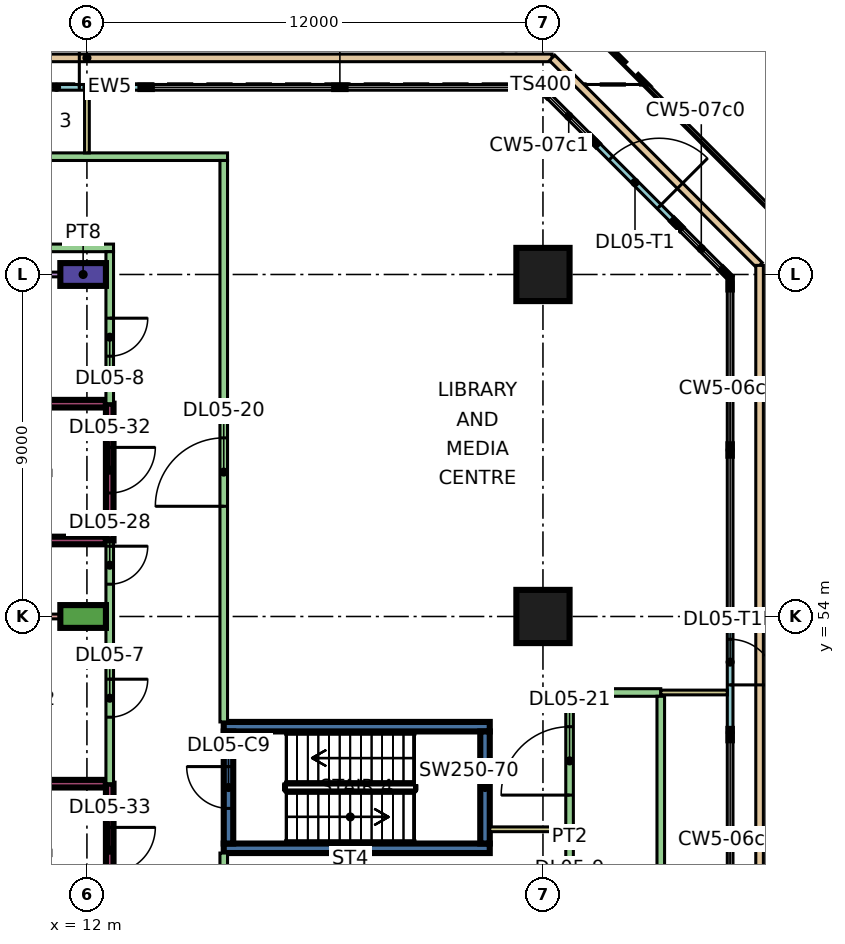
"""IFC4 building model, lengths in metres.
Left out: names, types, materials, properties, quantities, classifications, styles, units other than length and angle.
Written with IfcOpenShell. Run it as: python <this file> out.ifc"""

import sys

from ifc_helpers import new_model, si_unit, direction, frame, frame_2d, origin, origin_2d, place, context, subcontext, project, spatial, rectangle, extrude, element, fill, save


model = new_model("IFC4")
c1 = context("Model", 3, precision=1e-05, world=origin(), true_north=direction((0.0, 1.0)))
c2 = subcontext(c1, "Body", "Model", "MODEL_VIEW")
j1 = project(units=[si_unit("LENGTHUNIT", "METRE"), si_unit("PLANEANGLEUNIT", "RADIAN")], contexts=[c1])
p1 = place(None, origin())
s1 = spatial("IfcSite", under=j1, at=p1, CompositionType="ELEMENT")
p2 = place(p1, origin())
s2 = spatial("IfcBuilding", under=s1, at=p2, CompositionType="ELEMENT")
p3 = place(p2, frame((0.0, 0.0, 26.4)))
s3 = spatial("IfcBuildingStorey", under=s2, at=p3, CompositionType="ELEMENT", Elevation=26.4)
for number, where, z_axis, x_axis in (
    (1, (24.0, 54.0, 0.0), (0.0, 0.0, 1.0), (1.0, 0.0, 0.0)),
    (2, (24.0, 63.0, 0.0), (0.0, 0.0, 1.0), (1.0, 0.0, 0.0)),
):
    element("IfcColumn", number, at=place(p3, frame(where, z_axis=z_axis, x_axis=x_axis)), inside=s3, PredefinedType="COLUMN", context=c2, shape_type="SweptSolid", body=[
        extrude(rectangle(XDim=1.4, YDim=1.4, at=origin_2d()), origin(), (0.0, 0.0, 1.0), 9.0),
    ])
for number, where, z_axis, x_axis in (
    (3, (15.6, 47.9, 0.0), (0.0, 0.0, 1.0), (1.0, 0.0, 0.0)),
    (4, (15.6, 51.1, 0.0), (0.0, 0.0, 1.0), (1.0, 0.0, 0.0)),
):
    element("IfcWall", number, at=place(p3, frame(where, z_axis=z_axis, x_axis=x_axis)), inside=s3, PredefinedType="SHEAR", context=c2, shape_type="SweptSolid", body=[
        extrude(rectangle(XDim=7.0, YDim=0.25, at=frame_2d((3.5, 0.0))), origin(), (0.0, 0.0, 1.0), 9.0),
    ])
p4 = place(p3, frame((15.725, 48.025, 0.0), z_axis=(0.0, 0.0, 1.0), x_axis=(0.0, 1.0, 0.0)))
e5 = element("IfcWall", 5, at=p4, inside=s3, PredefinedType="SHEAR", context=c2, shape_type="SweptSolid", body=[
    extrude(rectangle(XDim=2.95, YDim=0.25, at=frame_2d((1.475, 0.0))), origin(), (0.0, 0.0, 1.0), 9.0),
])
p5 = place(p4, frame((0.925, 0.0, 0.0)))
e6 = element("IfcOpeningElement", 6, at=p5, cuts=e5, PredefinedType="OPENING", context=c2, shape_type="SweptSolid", body=[
    extrude(rectangle(XDim=1.1, YDim=2.2, at=frame_2d((0.55, 1.1))), frame((0.0, 0.135, 0.0), z_axis=(0.0, -1.0, 0.0), x_axis=(1.0, 0.0, 0.0)), (0.0, 0.0, 1.0), 0.27),
])
p6 = place(p3, frame((22.475, 48.025, 0.0), z_axis=(0.0, 0.0, 1.0), x_axis=(0.0, 1.0, 0.0)))
e7 = element("IfcWall", 7, at=p6, inside=s3, PredefinedType="SHEAR", context=c2, shape_type="SweptSolid", body=[
    extrude(rectangle(XDim=2.95, YDim=0.25, at=frame_2d((1.475, 0.0))), origin(), (0.0, 0.0, 1.0), 9.0),
])
p7 = place(p3, frame((28.925, 50.95, 0.0), z_axis=(0.0, 0.0, 1.0), x_axis=(0.0, 1.0, 0.0)))
e8 = element("IfcWall", 8, at=p7, inside=s3, PredefinedType="SOLIDWALL", context=c2, shape_type="SweptSolid", body=[
    extrude(rectangle(XDim=3.0, YDim=0.15, at=frame_2d((1.5, 0.0))), origin(), (0.0, 0.0, 1.0), 8.45),
])
p8 = place(p7, frame((1.25, 0.0, 0.0)))
e9 = element("IfcOpeningElement", 9, at=p8, cuts=e8, PredefinedType="OPENING", context=c2, shape_type="SweptSolid", body=[
    extrude(rectangle(XDim=1.2, YDim=2.4, at=frame_2d((0.6, 1.2))), frame((0.0, 0.085, 0.0), z_axis=(0.0, -1.0, 0.0), x_axis=(1.0, 0.0, 0.0)), (0.0, 0.0, 1.0), 0.17),
])
p9 = place(p3, frame((27.482, 64.361, 0.0), z_axis=(0.0, 0.0, 1.0), x_axis=(-0.707106781187, 0.707106781187, 0.0)))
e10 = element("IfcWall", 10, at=p9, inside=s3, PredefinedType="SOLIDWALL", context=c2, shape_type="SweptSolid", body=[
    extrude(rectangle(XDim=3.0, YDim=0.15, at=frame_2d((1.5, 0.0))), origin(), (0.0, 0.0, 1.0), 8.45),
])
p10 = place(p9, frame((0.6, 0.0, 0.0)))
e11 = element("IfcOpeningElement", 11, at=p10, cuts=e10, PredefinedType="OPENING", context=c2, shape_type="SweptSolid", body=[
    extrude(rectangle(XDim=1.8, YDim=2.4, at=frame_2d((0.9, 1.2))), frame((0.0, 0.085, 0.0), z_axis=(0.0, -1.0, 0.0), x_axis=(1.0, 0.0, 0.0)), (0.0, 0.0, 1.0), 0.17),
])
p11 = place(p3, frame((13.5, 67.925, 0.0), z_axis=(0.0, 0.0, 1.0), x_axis=(-1.0, 0.0, 0.0)))
e12 = element("IfcWall", 12, at=p11, inside=s3, PredefinedType="SOLIDWALL", context=c2, shape_type="SweptSolid", body=[
    extrude(rectangle(XDim=3.0, YDim=0.15, at=frame_2d((1.5, 0.0))), origin(), (0.0, 0.0, 1.0), 8.45),
])
p12 = place(p11, frame((1.7, 0.0, 0.0)))
e13 = element("IfcOpeningElement", 13, at=p12, cuts=e12, PredefinedType="OPENING", context=c2, shape_type="SweptSolid", body=[
    extrude(rectangle(XDim=1.2, YDim=2.4, at=frame_2d((0.6, 1.2))), frame((0.0, 0.085, 0.0), z_axis=(0.0, -1.0, 0.0), x_axis=(1.0, 0.0, 0.0)), (0.0, 0.0, 1.0), 0.17),
])
p13 = place(p3, frame((-0.24, 68.7, 0.0), z_axis=(0.0, 0.0, 1.0), x_axis=(1.0, 0.0, 0.0)))
e14 = element("IfcWall", 14, at=p13, inside=s3, PredefinedType="PARAPET", context=c2, shape_type="SweptSolid", body=[
    extrude(rectangle(XDim=24.479, YDim=0.2, at=frame_2d((12.24, 0.0))), origin(), (0.0, 0.0, 1.0), 0.5),
])
p14 = place(p3, frame((24.24, 68.7, 0.0), z_axis=(0.0, 0.0, 1.0), x_axis=(0.707106781187, -0.707106781187, 0.0)))
e15 = element("IfcWall", 15, at=p14, inside=s3, PredefinedType="PARAPET", context=c2, shape_type="SweptSolid", body=[
    extrude(rectangle(XDim=7.722, YDim=0.2, at=frame_2d((3.861, 0.0))), origin(), (0.0, 0.0, 1.0), 0.5),
])
p15 = place(p3, frame((29.7, 63.24, 0.0), z_axis=(0.0, 0.0, 1.0), x_axis=(0.0, -1.0, 0.0)))
e16 = element("IfcWall", 16, at=p15, inside=s3, PredefinedType="PARAPET", context=c2, shape_type="SweptSolid", body=[
    extrude(rectangle(XDim=21.0, YDim=0.2, at=frame_2d((10.5, 0.0))), origin(), (0.0, 0.0, 1.0), 0.5),
])
p16 = place(p3, frame((-0.8, 66.1, 0.0), z_axis=(0.0, 0.0, 1.0), x_axis=(1.0, 0.0, 0.0)))
e17 = element("IfcWall", 17, at=p16, inside=s3, PredefinedType="PARTITIONING", context=c2, shape_type="SweptSolid", body=[
    extrude(rectangle(XDim=16.5, YDim=0.2, at=frame_2d((8.25, 0.0))), origin(), (0.0, 0.0, 1.0), 8.45),
])
p17 = place(p16, frame((6.4, 0.0, 0.0)))
e18 = element("IfcOpeningElement", 18, at=p17, cuts=e17, PredefinedType="OPENING", context=c2, shape_type="SweptSolid", body=[
    extrude(rectangle(XDim=1.0, YDim=2.1, at=frame_2d((0.5, 1.05))), frame((0.0, 0.11, 0.0), z_axis=(0.0, -1.0, 0.0), x_axis=(1.0, 0.0, 0.0)), (0.0, 0.0, 1.0), 0.22),
])
p18 = place(p3, frame((-0.6, 49.6, 0.0), z_axis=(0.0, 0.0, 1.0), x_axis=(1.0, 0.0, 0.0)))
e19 = element("IfcWall", 19, at=p18, inside=s3, PredefinedType="SOLIDWALL", context=c2, shape_type="SweptSolid", body=[
    extrude(rectangle(XDim=13.1, YDim=0.2, at=frame_2d((6.55, 0.0))), origin(), (0.0, 0.0, 1.0), 8.45),
])
p19 = place(p3, frame((-0.6, 54.0, 0.0), z_axis=(0.0, 0.0, 1.0), x_axis=(1.0, 0.0, 0.0)))
e20 = element("IfcWall", 20, at=p19, inside=s3, PredefinedType="PARTITIONING", context=c2, shape_type="SweptSolid", body=[
    extrude(rectangle(XDim=11.9, YDim=0.125, at=frame_2d((5.95, 0.0))), origin(), (0.0, 0.0, 1.0), 6.55),
])
for number, where, z_axis, x_axis in (
    (21, (-0.6, 56.0, 0.0), (0.0, 0.0, 1.0), (1.0, 0.0, 0.0)),
    (22, (-0.6, 59.6, 0.0), (0.0, 0.0, 1.0), (1.0, 0.0, 0.0)),
):
    element("IfcWall", number, at=place(p3, frame(where, z_axis=z_axis, x_axis=x_axis)), inside=s3, PredefinedType="SOLIDWALL", context=c2, shape_type="SweptSolid", body=[
        extrude(rectangle(XDim=13.1, YDim=0.2, at=frame_2d((6.55, 0.0))), origin(), (0.0, 0.0, 1.0), 8.45),
    ])
p20 = place(p3, frame((-0.6, 63.7, 0.0), z_axis=(0.0, 0.0, 1.0), x_axis=(1.0, 0.0, 0.0)))
e23 = element("IfcWall", 23, at=p20, inside=s3, PredefinedType="PARTITIONING", context=c2, shape_type="SweptSolid", body=[
    extrude(rectangle(XDim=13.3, YDim=0.2, at=frame_2d((6.65, 0.0))), origin(), (0.0, 0.0, 1.0), 8.45),
])
p21 = place(p20, frame((6.05, 0.0, 0.0)))
e24 = element("IfcOpeningElement", 24, at=p21, cuts=e23, PredefinedType="OPENING", context=c2, shape_type="SweptSolid", body=[
    extrude(rectangle(XDim=1.0, YDim=2.1, at=frame_2d((0.5, 1.05))), frame((0.0, 0.11, 0.0), z_axis=(0.0, -1.0, 0.0), x_axis=(1.0, 0.0, 0.0)), (0.0, 0.0, 1.0), 0.22),
])
p22 = place(p3, frame((5.938, 63.0, 0.0), z_axis=(0.0, 0.0, 1.0), x_axis=(1.0, 0.0, 0.0)))
e25 = element("IfcWall", 25, at=p22, inside=s3, PredefinedType="PARTITIONING", context=c2, shape_type="SweptSolid", body=[
    extrude(rectangle(XDim=5.362, YDim=0.125, at=frame_2d((2.681, 0.0))), origin(), (0.0, 0.0, 1.0), 6.95),
])
p23 = place(p3, frame((12.0, 66.2, 0.0), z_axis=(0.0, 0.0, 1.0), x_axis=(0.0, 1.0, 0.0)))
e26 = element("IfcWall", 26, at=p23, inside=s3, PredefinedType="PARTITIONING", context=c2, shape_type="SweptSolid", body=[
    extrude(rectangle(XDim=1.651, YDim=0.125, at=frame_2d((0.826, 0.0))), origin(), (0.0, 0.0, 1.0), 8.45),
])
p24 = place(p3, frame((12.6, 45.0, 0.0), z_axis=(0.0, 0.0, 1.0), x_axis=(0.0, 1.0, 0.0)))
e27 = element("IfcWall", 27, at=p24, inside=s3, PredefinedType="SOLIDWALL", context=c2, shape_type="SweptSolid", body=[
    extrude(rectangle(XDim=4.6, YDim=0.2, at=frame_2d((2.3, 0.0))), origin(), (0.0, 0.0, 1.0), 8.45),
])
p25 = place(p24, frame((2.25, 0.0, 0.0)))
e28 = element("IfcOpeningElement", 28, at=p25, cuts=e27, PredefinedType="OPENING", context=c2, shape_type="SweptSolid", body=[
    extrude(rectangle(XDim=1.2, YDim=2.1, at=frame_2d((0.6, 1.05))), frame((0.0, 0.11, 0.0), z_axis=(0.0, -1.0, 0.0), x_axis=(1.0, 0.0, 0.0)), (0.0, 0.0, 1.0), 0.22),
])
p26 = place(p3, frame((12.6, 49.6, 0.0), z_axis=(0.0, 0.0, 1.0), x_axis=(0.0, 1.0, 0.0)))
e29 = element("IfcWall", 29, at=p26, inside=s3, PredefinedType="PARTITIONING", context=c2, shape_type="SweptSolid", body=[
    extrude(rectangle(XDim=6.4, YDim=0.2, at=frame_2d((3.2, 0.0))), origin(), (0.0, 0.0, 1.0), 8.45),
])
p27 = place(p26, frame((1.75, 0.0, 0.0)))
e30 = element("IfcOpeningElement", 30, at=p27, cuts=e29, PredefinedType="OPENING", context=c2, shape_type="SweptSolid", body=[
    extrude(rectangle(XDim=1.0, YDim=2.1, at=frame_2d((0.5, 1.05))), frame((0.0, 0.11, 0.0), z_axis=(0.0, -1.0, 0.0), x_axis=(1.0, 0.0, 0.0)), (0.0, 0.0, 1.0), 0.22),
])
p28 = place(p26, frame((5.25, 0.0, 0.0)))
e31 = element("IfcOpeningElement", 31, at=p28, cuts=e29, PredefinedType="OPENING", context=c2, shape_type="SweptSolid", body=[
    extrude(rectangle(XDim=1.0, YDim=2.1, at=frame_2d((0.5, 1.05))), frame((0.0, 0.11, 0.0), z_axis=(0.0, -1.0, 0.0), x_axis=(1.0, 0.0, 0.0)), (0.0, 0.0, 1.0), 0.22),
])
p29 = place(p3, frame((12.6, 56.0, 0.0), z_axis=(0.0, 0.0, 1.0), x_axis=(0.0, 1.0, 0.0)))
e32 = element("IfcWall", 32, at=p29, inside=s3, PredefinedType="SOLIDWALL", context=c2, shape_type="SweptSolid", body=[
    extrude(rectangle(XDim=3.6, YDim=0.2, at=frame_2d((1.8, 0.0))), origin(), (0.0, 0.0, 1.0), 8.45),
])
p30 = place(p29, frame((1.25, 0.0, 0.0)))
e33 = element("IfcOpeningElement", 33, at=p30, cuts=e32, PredefinedType="OPENING", context=c2, shape_type="SweptSolid", body=[
    extrude(rectangle(XDim=1.2, YDim=2.1, at=frame_2d((0.6, 1.05))), frame((0.0, 0.11, 0.0), z_axis=(0.0, -1.0, 0.0), x_axis=(1.0, 0.0, 0.0)), (0.0, 0.0, 1.0), 0.22),
])
p31 = place(p3, frame((12.6, 59.6, 0.0), z_axis=(0.0, 0.0, 1.0), x_axis=(0.0, 1.0, 0.0)))
e34 = element("IfcWall", 34, at=p31, inside=s3, PredefinedType="PARTITIONING", context=c2, shape_type="SweptSolid", body=[
    extrude(rectangle(XDim=4.0, YDim=0.2, at=frame_2d((2.0, 0.0))), origin(), (0.0, 0.0, 1.0), 8.45),
])
p32 = place(p31, frame((1.25, 0.0, 0.0)))
e35 = element("IfcOpeningElement", 35, at=p32, cuts=e34, PredefinedType="OPENING", context=c2, shape_type="SweptSolid", body=[
    extrude(rectangle(XDim=1.0, YDim=2.1, at=frame_2d((0.5, 1.05))), frame((0.0, 0.11, 0.0), z_axis=(0.0, -1.0, 0.0), x_axis=(1.0, 0.0, 0.0)), (0.0, 0.0, 1.0), 0.22),
])
p33 = place(p3, frame((15.6, 44.2, 0.0), z_axis=(0.0, 0.0, 1.0), x_axis=(0.0, 1.0, 0.0)))
e36 = element("IfcWall", 36, at=p33, inside=s3, PredefinedType="PARTITIONING", context=c2, shape_type="SweptSolid", body=[
    extrude(rectangle(XDim=3.575, YDim=0.2, at=frame_2d((1.788, 0.0))), origin(), (0.0, 0.0, 1.0), 8.45),
])
p34 = place(p3, frame((15.6, 51.225, 0.0), z_axis=(0.0, 0.0, 1.0), x_axis=(0.0, 1.0, 0.0)))
e37 = element("IfcWall", 37, at=p34, inside=s3, PredefinedType="PARTITIONING", context=c2, shape_type="SweptSolid", body=[
    extrude(rectangle(XDim=14.775, YDim=0.2, at=frame_2d((7.387, 0.0))), origin(), (0.0, 0.0, 1.0), 8.45),
])
p35 = place(p34, frame((5.675, 0.0, 0.0)))
e38 = element("IfcOpeningElement", 38, at=p35, cuts=e37, PredefinedType="OPENING", context=c2, shape_type="SweptSolid", body=[
    extrude(rectangle(XDim=1.8, YDim=2.1, at=frame_2d((0.9, 1.05))), frame((0.0, 0.11, 0.0), z_axis=(0.0, -1.0, 0.0), x_axis=(1.0, 0.0, 0.0)), (0.0, 0.0, 1.0), 0.22),
])
p36 = place(p3, frame((22.6, 48.4, 0.0), z_axis=(0.0, 0.0, 1.0), x_axis=(1.0, 0.0, 0.0)))
e39 = element("IfcWall", 39, at=p36, inside=s3, PredefinedType="PARTITIONING", context=c2, shape_type="SweptSolid", body=[
    extrude(rectangle(XDim=2.0, YDim=0.125, at=frame_2d((1.0, 0.0))), origin(), (0.0, 0.0, 1.0), 8.45),
])
p37 = place(p3, frame((24.7, 44.3, 0.0), z_axis=(0.0, 0.0, 1.0), x_axis=(0.0, 1.0, 0.0)))
e40 = element("IfcWall", 40, at=p37, inside=s3, PredefinedType="PARTITIONING", context=c2, shape_type="SweptSolid", body=[
    extrude(rectangle(XDim=7.8, YDim=0.2, at=frame_2d((3.9, 0.0))), origin(), (0.0, 0.0, 1.0), 8.45),
])
p38 = place(p37, frame((1.45, 0.0, 0.0)))
e41 = element("IfcOpeningElement", 41, at=p38, cuts=e40, PredefinedType="OPENING", context=c2, shape_type="SweptSolid", body=[
    extrude(rectangle(XDim=1.0, YDim=2.1, at=frame_2d((0.5, 1.05))), frame((0.0, 0.11, 0.0), z_axis=(0.0, -1.0, 0.0), x_axis=(1.0, 0.0, 0.0)), (0.0, 0.0, 1.0), 0.22),
])
p39 = place(p37, frame((5.0, 0.0, 0.0)))
e42 = element("IfcOpeningElement", 42, at=p39, cuts=e40, PredefinedType="OPENING", context=c2, shape_type="SweptSolid", body=[
    extrude(rectangle(XDim=1.8, YDim=2.1, at=frame_2d((0.9, 1.05))), frame((0.0, 0.11, 0.0), z_axis=(0.0, -1.0, 0.0), x_axis=(1.0, 0.0, 0.0)), (0.0, 0.0, 1.0), 0.22),
])
p40 = place(p3, frame((24.8, 52.0, 0.0), z_axis=(0.0, 0.0, 1.0), x_axis=(1.0, 0.0, 0.0)))
e43 = element("IfcWall", 43, at=p40, inside=s3, PredefinedType="PARTITIONING", context=c2, shape_type="SweptSolid", body=[
    extrude(rectangle(XDim=2.3, YDim=0.2, at=frame_2d((1.15, 0.0))), origin(), (0.0, 0.0, 1.0), 8.45),
])
p41 = place(p3, frame((27.1, 38.3, 0.0), z_axis=(0.0, 0.0, 1.0), x_axis=(0.0, 1.0, 0.0)))
e44 = element("IfcWall", 44, at=p41, inside=s3, PredefinedType="PARTITIONING", context=c2, shape_type="SweptSolid", body=[
    extrude(rectangle(XDim=13.6, YDim=0.2, at=frame_2d((6.8, 0.0))), origin(), (0.0, 0.0, 1.0), 8.45),
])
p42 = place(p41, frame((6.5, 0.0, 0.0)))
e45 = element("IfcOpeningElement", 45, at=p42, cuts=e44, PredefinedType="OPENING", context=c2, shape_type="SweptSolid", body=[
    extrude(rectangle(XDim=1.0, YDim=2.1, at=frame_2d((0.5, 1.05))), frame((0.0, 0.11, 0.0), z_axis=(0.0, -1.0, 0.0), x_axis=(1.0, 0.0, 0.0)), (0.0, 0.0, 1.0), 0.22),
])
p43 = place(p3, frame((27.1, 52.0, 0.0), z_axis=(0.0, 0.0, 1.0), x_axis=(1.0, 0.0, 0.0)))
e46 = element("IfcWall", 46, at=p43, inside=s3, PredefinedType="PARTITIONING", context=c2, shape_type="SweptSolid", body=[
    extrude(rectangle(XDim=1.751, YDim=0.125, at=frame_2d((0.875, 0.0))), origin(), (0.0, 0.0, 1.0), 8.45),
])
p44 = place(p3, frame((11.3, 54.0, 0.0), z_axis=(0.0, 0.0, 1.0), x_axis=(1.0, 0.0, 0.0)))
e47 = element("IfcWall", 47, at=p44, inside=s3, PredefinedType="SOLIDWALL", context=c2, shape_type="SweptSolid", body=[
    extrude(rectangle(XDim=1.2, YDim=0.6, at=frame_2d((0.6, 0.0))), origin(), (0.0, 0.0, 1.0), 6.55),
])
p45 = place(p3, frame((11.3, 63.0, 0.0), z_axis=(0.0, 0.0, 1.0), x_axis=(1.0, 0.0, 0.0)))
e48 = element("IfcWall", 48, at=p45, inside=s3, PredefinedType="SOLIDWALL", context=c2, shape_type="SweptSolid", body=[
    extrude(rectangle(XDim=1.2, YDim=0.6, at=frame_2d((0.6, 0.0))), origin(), (0.0, 0.0, 1.0), 6.95),
])
p46 = place(p8, frame((1.2, 0.0, 0.0), z_axis=(0.0, 0.0, 1.0), x_axis=(-1.0, 0.0, 0.0)))
e49 = element("IfcDoor", 49, at=p46, inside=s3, OperationType="DOUBLE_DOOR_SINGLE_SWING", PredefinedType="DOOR", context=c2, shape_type="SweptSolid", body=[
    extrude(rectangle(XDim=1.2, YDim=2.4, at=frame_2d((0.6, 1.2))), frame((0.0, 0.025, 0.0), z_axis=(0.0, -1.0, 0.0), x_axis=(1.0, 0.0, 0.0)), (0.0, 0.0, 1.0), 0.05),
])
fill(e9, e49)
p47 = place(p10, frame((1.8, 0.0, 0.0), z_axis=(0.0, 0.0, 1.0), x_axis=(-1.0, 0.0, 0.0)))
e50 = element("IfcDoor", 50, at=p47, inside=s3, OperationType="DOUBLE_DOOR_SINGLE_SWING", PredefinedType="DOOR", context=c2, shape_type="SweptSolid", body=[
    extrude(rectangle(XDim=1.8, YDim=2.4, at=frame_2d((0.9, 1.2))), frame((0.0, 0.025, 0.0), z_axis=(0.0, -1.0, 0.0), x_axis=(1.0, 0.0, 0.0)), (0.0, 0.0, 1.0), 0.05),
])
fill(e11, e50)
p48 = place(p12, frame((1.2, 0.0, 0.0), z_axis=(0.0, 0.0, 1.0), x_axis=(-1.0, 0.0, 0.0)))
e51 = element("IfcDoor", 51, at=p48, inside=s3, OperationType="DOUBLE_DOOR_SINGLE_SWING", PredefinedType="DOOR", context=c2, shape_type="SweptSolid", body=[
    extrude(rectangle(XDim=1.2, YDim=2.4, at=frame_2d((0.6, 1.2))), frame((0.0, 0.025, 0.0), z_axis=(0.0, -1.0, 0.0), x_axis=(1.0, 0.0, 0.0)), (0.0, 0.0, 1.0), 0.05),
])
fill(e13, e51)
p49 = place(p5, frame((1.1, 0.0, 0.0), z_axis=(0.0, 0.0, 1.0), x_axis=(-1.0, 0.0, 0.0)))
e52 = element("IfcDoor", 52, at=p49, inside=s3, OperationType="SINGLE_SWING_RIGHT", PredefinedType="DOOR", context=c2, shape_type="SweptSolid", body=[
    extrude(rectangle(XDim=1.1, YDim=2.2, at=frame_2d((0.55, 1.1))), frame((0.0, 0.025, 0.0), z_axis=(0.0, -1.0, 0.0), x_axis=(1.0, 0.0, 0.0)), (0.0, 0.0, 1.0), 0.05),
])
fill(e6, e52)
p50 = place(p27, origin())
e53 = element("IfcDoor", 53, at=p50, inside=s3, OperationType="SINGLE_SWING_RIGHT", PredefinedType="DOOR", context=c2, shape_type="SweptSolid", body=[
    extrude(rectangle(XDim=1.0, YDim=2.1, at=frame_2d((0.5, 1.05))), frame((0.0, 0.025, 0.0), z_axis=(0.0, -1.0, 0.0), x_axis=(1.0, 0.0, 0.0)), (0.0, 0.0, 1.0), 0.05),
])
fill(e30, e53)
p51 = place(p32, origin())
e54 = element("IfcDoor", 54, at=p51, inside=s3, OperationType="SINGLE_SWING_RIGHT", PredefinedType="DOOR", context=c2, shape_type="SweptSolid", body=[
    extrude(rectangle(XDim=1.0, YDim=2.1, at=frame_2d((0.5, 1.05))), frame((0.0, 0.025, 0.0), z_axis=(0.0, -1.0, 0.0), x_axis=(1.0, 0.0, 0.0)), (0.0, 0.0, 1.0), 0.05),
])
fill(e35, e54)
p52 = place(p35, origin())
e55 = element("IfcDoor", 55, at=p52, inside=s3, OperationType="DOUBLE_DOOR_SINGLE_SWING", PredefinedType="DOOR", context=c2, shape_type="SweptSolid", body=[
    extrude(rectangle(XDim=1.8, YDim=2.1, at=frame_2d((0.9, 1.05))), frame((0.0, 0.025, 0.0), z_axis=(0.0, -1.0, 0.0), x_axis=(1.0, 0.0, 0.0)), (0.0, 0.0, 1.0), 0.05),
])
fill(e38, e55)
p53 = place(p39, origin())
e56 = element("IfcDoor", 56, at=p53, inside=s3, OperationType="DOUBLE_DOOR_SINGLE_SWING", PredefinedType="DOOR", context=c2, shape_type="SweptSolid", body=[
    extrude(rectangle(XDim=1.8, YDim=2.1, at=frame_2d((0.9, 1.05))), frame((0.0, 0.025, 0.0), z_axis=(0.0, -1.0, 0.0), x_axis=(1.0, 0.0, 0.0)), (0.0, 0.0, 1.0), 0.05),
])
fill(e42, e56)
p54 = place(p28, origin())
e57 = element("IfcDoor", 57, at=p54, inside=s3, OperationType="SINGLE_SWING_RIGHT", PredefinedType="DOOR", context=c2, shape_type="SweptSolid", body=[
    extrude(rectangle(XDim=1.0, YDim=2.1, at=frame_2d((0.5, 1.05))), frame((0.0, 0.025, 0.0), z_axis=(0.0, -1.0, 0.0), x_axis=(1.0, 0.0, 0.0)), (0.0, 0.0, 1.0), 0.05),
])
fill(e31, e57)
p55 = place(p30, origin())
e58 = element("IfcDoor", 58, at=p55, inside=s3, OperationType="SINGLE_SWING_RIGHT", PredefinedType="DOOR", context=c2, shape_type="SweptSolid", body=[
    extrude(rectangle(XDim=1.2, YDim=2.1, at=frame_2d((0.6, 1.05))), frame((0.0, 0.025, 0.0), z_axis=(0.0, -1.0, 0.0), x_axis=(1.0, 0.0, 0.0)), (0.0, 0.0, 1.0), 0.05),
])
fill(e33, e58)
p56 = place(p25, origin())
e59 = element("IfcDoor", 59, at=p56, inside=s3, OperationType="SINGLE_SWING_RIGHT", PredefinedType="DOOR", context=c2, shape_type="SweptSolid", body=[
    extrude(rectangle(XDim=1.2, YDim=2.1, at=frame_2d((0.6, 1.05))), frame((0.0, 0.025, 0.0), z_axis=(0.0, -1.0, 0.0), x_axis=(1.0, 0.0, 0.0)), (0.0, 0.0, 1.0), 0.05),
])
fill(e28, e59)
save(model, sys.argv[1])
